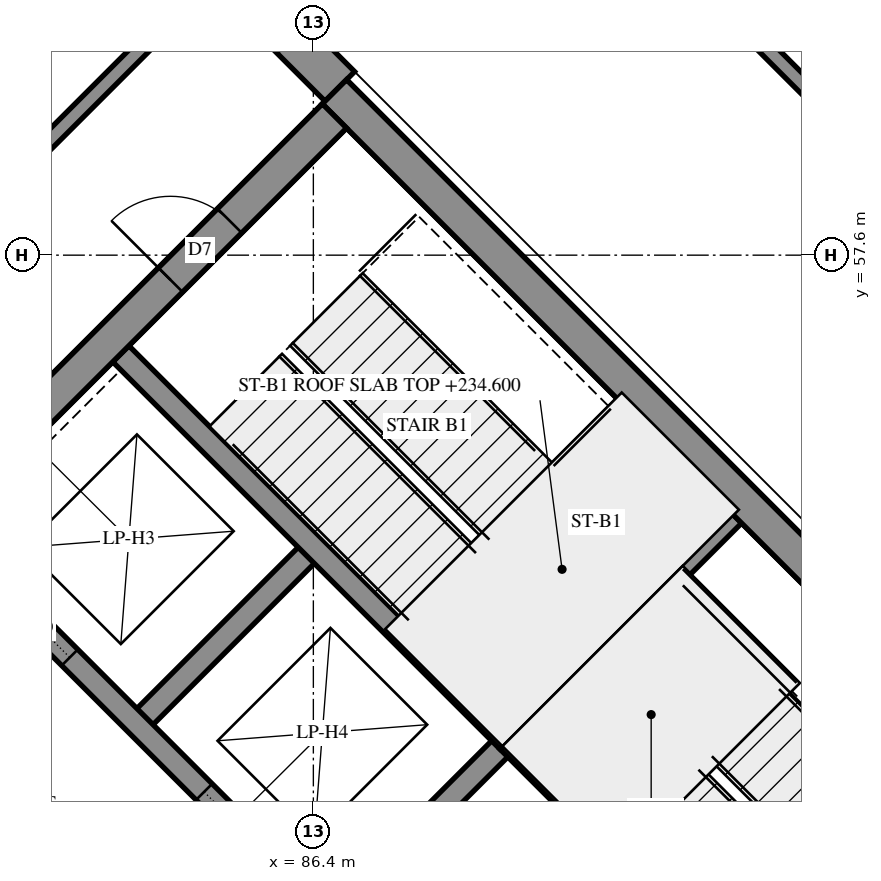
"""IFC4 building model, lengths in metres.
Left out: names, types, materials, properties, quantities, classifications, styles, units other than length and angle.
Written with IfcOpenShell. Run it as: python <this file> out.ifc"""

import sys

from ifc_helpers import new_model, si_unit, direction, frame, frame_2d, origin, place, context, subcontext, project, spatial, polyline, rectangle, outline, extrude, element, fill, save


model = new_model("IFC4")
c1 = context("Model", 3, precision=1e-05, world=origin(), true_north=direction((0.0, 1.0)))
c2 = subcontext(c1, "Body", "Model", "MODEL_VIEW")
j1 = project(units=[si_unit("LENGTHUNIT", "METRE"), si_unit("PLANEANGLEUNIT", "RADIAN")], contexts=[c1])
p1 = place(None, origin())
s1 = spatial("IfcSite", under=j1, at=p1, CompositionType="ELEMENT")
p2 = place(p1, origin())
s2 = spatial("IfcBuilding", under=s1, at=p2, CompositionType="ELEMENT")
p3 = place(p2, frame((0.0, 0.0, 234.6)))
s3 = spatial("IfcBuildingStorey", under=s2, at=p3, CompositionType="ELEMENT", Elevation=234.6)
p4 = place(p3, frame((86.678, 59.749, -0.3), z_axis=(0.0, 0.0, 1.0), x_axis=(0.7071035132, -0.7071100491, 0.0)))
e1 = element("IfcWall", 1, at=p4, inside=s3, PredefinedType="SHEAR", context=c2, shape_type="SweptSolid", body=[
    extrude(rectangle(XDim=15.3, YDim=0.45, at=frame_2d((7.65, 0.0))), origin(), (0.0, 0.0, 1.0), 4.3),
])
p5 = place(p3, frame((76.495, 49.249, -0.3), z_axis=(0.0, 0.0, 1.0), x_axis=(0.7071067812, 0.7071067812, 0.0)))
e2 = element("IfcWall", 2, at=p5, inside=s3, PredefinedType="SHEAR", context=c2, shape_type="SweptSolid", body=[
    extrude(rectangle(XDim=14.4, YDim=0.45, at=frame_2d((7.2, 0.0))), origin(), (0.0, 0.0, 1.0), 4.3),
])
p6 = place(p5, frame((4.55, 0.0, 0.3)))
e3 = element("IfcOpeningElement", 3, at=p6, cuts=e2, PredefinedType="OPENING", context=c2, shape_type="SweptSolid", body=[
    extrude(rectangle(XDim=1.1, YDim=2.1, at=frame_2d((0.55, 1.05))), frame((0.0, 0.235, 0.0), z_axis=(0.0, -1.0, 0.0), x_axis=(1.0, 0.0, 0.0)), (0.0, 0.0, 1.0), 0.47),
])
p7 = place(p5, frame((11.35, 0.0, 0.3)))
e4 = element("IfcOpeningElement", 4, at=p7, cuts=e2, PredefinedType="OPENING", context=c2, shape_type="SweptSolid", body=[
    extrude(rectangle(XDim=1.1, YDim=2.1, at=frame_2d((0.55, 1.05))), frame((0.0, 0.235, 0.0), z_axis=(0.0, -1.0, 0.0), x_axis=(1.0, 0.0, 0.0)), (0.0, 0.0, 1.0), 0.47),
])
p8 = place(p3, frame((84.079, 51.423, 0.0), z_axis=(0.0, 0.0, 1.0), x_axis=(0.7071219326, 0.7070916295, 0.0)))
e5 = element("IfcWall", 5, at=p8, inside=s3, PredefinedType="SOLIDWALL", context=c2, shape_type="SweptSolid", body=[
    extrude(rectangle(XDim=3.3, YDim=0.3, at=frame_2d((1.65, 0.0))), origin(), (0.0, 0.0, 1.0), 4.7),
])
p9 = place(p3, frame((86.625, 48.878, 0.0), z_axis=(0.0, 0.0, 1.0), x_axis=(0.7071067812, 0.7071067812, 0.0)))
e6 = element("IfcWall", 6, at=p9, inside=s3, PredefinedType="SOLIDWALL", context=c2, shape_type="SweptSolid", body=[
    extrude(rectangle(XDim=3.3, YDim=0.3, at=frame_2d((1.65, 0.0))), origin(), (0.0, 0.0, 1.0), 4.7),
])
p10 = place(p3, frame((78.988, 51.423, 0.0), z_axis=(0.0, 0.0, 1.0), x_axis=(0.7071067812, -0.7071067812, 0.0)))
e7 = element("IfcWall", 7, at=p10, inside=s3, PredefinedType="SOLIDWALL", context=c2, shape_type="SweptSolid", body=[
    extrude(rectangle(XDim=14.4, YDim=0.3, at=frame_2d((7.2, 0.0))), origin(), (0.0, 0.0, 1.0), 4.7),
])
p11 = place(p10, frame((1.35, 0.0, 0.0)))
e8 = element("IfcOpeningElement", 8, at=p11, cuts=e7, PredefinedType="OPENING", context=c2, shape_type="SweptSolid", body=[
    extrude(rectangle(XDim=0.9, YDim=2.1, at=frame_2d((0.45, 1.05))), frame((0.0, 0.16, 0.0), z_axis=(0.0, -1.0, 0.0), x_axis=(1.0, 0.0, 0.0)), (0.0, 0.0, 1.0), 0.32),
])
p12 = place(p10, frame((4.95, 0.0, 0.0)))
e9 = element("IfcOpeningElement", 9, at=p12, cuts=e7, PredefinedType="OPENING", context=c2, shape_type="SweptSolid", body=[
    extrude(rectangle(XDim=0.9, YDim=2.1, at=frame_2d((0.45, 1.05))), frame((0.0, 0.16, 0.0), z_axis=(0.0, -1.0, 0.0), x_axis=(1.0, 0.0, 0.0)), (0.0, 0.0, 1.0), 0.32),
])
p13 = place(p10, frame((8.55, 0.0, 0.0)))
e10 = element("IfcOpeningElement", 10, at=p13, cuts=e7, PredefinedType="OPENING", context=c2, shape_type="SweptSolid", body=[
    extrude(rectangle(XDim=0.9, YDim=2.1, at=frame_2d((0.45, 1.05))), frame((0.0, 0.16, 0.0), z_axis=(0.0, -1.0, 0.0), x_axis=(1.0, 0.0, 0.0)), (0.0, 0.0, 1.0), 0.32),
])
p14 = place(p10, frame((12.05, 0.0, 0.0)))
e11 = element("IfcOpeningElement", 11, at=p14, cuts=e7, PredefinedType="OPENING", context=c2, shape_type="SweptSolid", body=[
    extrude(rectangle(XDim=1.1, YDim=2.1, at=frame_2d((0.55, 1.05))), frame((0.0, 0.16, 0.0), z_axis=(0.0, -1.0, 0.0), x_axis=(1.0, 0.0, 0.0)), (0.0, 0.0, 1.0), 0.32),
])
p15 = place(p3, frame((81.534, 53.969, 0.0), z_axis=(0.0, 0.0, 1.0), x_axis=(0.707103309, -0.7071102534, 0.0)))
e12 = element("IfcWall", 12, at=p15, inside=s3, PredefinedType="SOLIDWALL", context=c2, shape_type="SweptSolid", body=[
    extrude(rectangle(XDim=14.4, YDim=0.3, at=frame_2d((7.2, 0.0))), origin(), (0.0, 0.0, 1.0), 4.7),
])
p16 = place(p15, frame((1.25, 0.0, 0.0)))
e13 = element("IfcOpeningElement", 13, at=p16, cuts=e12, PredefinedType="OPENING", context=c2, shape_type="SweptSolid", body=[
    extrude(rectangle(XDim=1.1, YDim=2.1, at=frame_2d((0.55, 1.05))), frame((0.0, 0.16, 0.0), z_axis=(0.0, -1.0, 0.0), x_axis=(1.0, 0.0, 0.0)), (0.0, 0.0, 1.0), 0.32),
])
p17 = place(p15, frame((4.85, 0.0, 0.0)))
e14 = element("IfcOpeningElement", 14, at=p17, cuts=e12, PredefinedType="OPENING", context=c2, shape_type="SweptSolid", body=[
    extrude(rectangle(XDim=1.1, YDim=2.1, at=frame_2d((0.55, 1.05))), frame((0.0, 0.16, 0.0), z_axis=(0.0, -1.0, 0.0), x_axis=(1.0, 0.0, 0.0)), (0.0, 0.0, 1.0), 0.32),
])
p18 = place(p15, frame((8.45, 0.0, 0.0)))
e15 = element("IfcOpeningElement", 15, at=p18, cuts=e12, PredefinedType="OPENING", context=c2, shape_type="SweptSolid", body=[
    extrude(rectangle(XDim=1.1, YDim=2.1, at=frame_2d((0.55, 1.05))), frame((0.0, 0.16, 0.0), z_axis=(0.0, -1.0, 0.0), x_axis=(1.0, 0.0, 0.0)), (0.0, 0.0, 1.0), 0.32),
])
p19 = place(p15, frame((12.05, 0.0, 0.0)))
e16 = element("IfcOpeningElement", 16, at=p19, cuts=e12, PredefinedType="OPENING", context=c2, shape_type="SweptSolid", body=[
    extrude(rectangle(XDim=1.1, YDim=2.1, at=frame_2d((0.55, 1.05))), frame((0.0, 0.16, 0.0), z_axis=(0.0, -1.0, 0.0), x_axis=(1.0, 0.0, 0.0)), (0.0, 0.0, 1.0), 0.32),
])
for number, where, z_axis, x_axis in (
    (17, (83.867, 56.302, 0.0), (0.0, 0.0, 1.0), (0.707, -0.707, 0.0)),
    (18, (88.958, 51.211, 0.0), (0.0, 0.0, 1.0), (0.707, -0.707, 0.0)),
):
    element("IfcWall", number, at=place(p3, frame(where, z_axis=z_axis, x_axis=x_axis)), inside=s3, PredefinedType="SOLIDWALL", context=c2, shape_type="SweptSolid", body=[
        extrude(rectangle(XDim=7.2, YDim=0.3, at=frame_2d((3.6, 0.0))), origin(), (0.0, 0.0, 1.0), 4.7),
    ])
p20 = place(p3, frame((88.958, 51.211, 0.0), z_axis=(0.0, 0.0, 1.0), x_axis=(0.7071067812, 0.7071067812, 0.0)))
e19 = element("IfcWall", 19, at=p20, inside=s3, PredefinedType="SOLIDWALL", context=c2, shape_type="SweptSolid", body=[
    extrude(rectangle(XDim=4.2, YDim=0.3, at=frame_2d((2.1, 0.0))), origin(), (0.0, 0.0, 1.0), 4.7),
])
p21 = place(p3, frame((86.748, 59.82, 0.0), z_axis=(0.0, 0.0, 1.0), x_axis=(-0.7071067812, 0.7071067812, 0.0)))
e20 = element("IfcWall", 20, at=p21, inside=s3, PredefinedType="SOLIDWALL", context=c2, shape_type="SweptSolid", body=[
    extrude(outline(polyline([(0.0, -0.275), (12.707, -0.275), (12.479, 0.275), (0.0, 0.275), (0.0, -0.275)])), origin(), (0.0, 0.0, 1.0), 4.7),
])
p22 = place(p21, frame((4.05, 0.0, 0.9)))
e21 = element("IfcOpeningElement", 21, at=p22, cuts=e20, PredefinedType="OPENING", context=c2, shape_type="SweptSolid", body=[
    extrude(rectangle(XDim=1.8, YDim=3.6, at=frame_2d((0.9, 1.8))), frame((0.0, 0.285, 0.0), z_axis=(0.0, -1.0, 0.0), x_axis=(1.0, 0.0, 0.0)), (0.0, 0.0, 1.0), 0.57),
])
p23 = place(p21, frame((7.6, 0.0, 0.9)))
e22 = element("IfcOpeningElement", 22, at=p23, cuts=e20, PredefinedType="OPENING", context=c2, shape_type="SweptSolid", body=[
    extrude(rectangle(XDim=1.8, YDim=3.6, at=frame_2d((0.9, 1.8))), frame((0.0, 0.285, 0.0), z_axis=(0.0, -1.0, 0.0), x_axis=(1.0, 0.0, 0.0)), (0.0, 0.0, 1.0), 0.57),
])
p24 = place(p21, frame((0.888, 0.0, 0.7)))
e23 = element("IfcOpeningElement", 23, at=p24, cuts=e20, PredefinedType="OPENING", context=c2, shape_type="SweptSolid", body=[
    extrude(rectangle(XDim=1.2, YDim=2.3, at=frame_2d((0.6, 1.15))), frame((0.0, 0.285, 0.0), z_axis=(0.0, -1.0, 0.0), x_axis=(1.0, 0.0, 0.0)), (0.0, 0.0, 1.0), 0.57),
])
p25 = place(p3, frame((102.747, 49.938, 0.0), z_axis=(0.0, 0.0, 1.0), x_axis=(-0.7071083109, 0.7071052514, 0.0)))
e24 = element("IfcWall", 24, at=p25, inside=s3, PredefinedType="SOLIDWALL", context=c2, shape_type="SweptSolid", body=[
    extrude(outline(polyline([(-0.1, -0.1), (32.726, -0.1), (32.644, 0.1), (0.1, 0.1), (-0.1, -0.1)])), origin(), (0.0, 0.0, 1.0), 4.7),
])
p26 = place(p3, frame((80.85, 57.034, 0.0), z_axis=(0.0, 0.0, 1.0), x_axis=(0.7071067812, 0.7071067812, 0.0)))
e25 = element("IfcWall", 25, at=p26, inside=s3, PredefinedType="PARTITIONING", context=c2, shape_type="SweptSolid", body=[
    extrude(rectangle(XDim=5.866, YDim=0.2, at=frame_2d((2.933, 0.0))), origin(), (0.0, 0.0, 1.0), 4.7),
])
p27 = place(p26, frame((0.839, 0.0, 0.0)))
e26 = element("IfcOpeningElement", 26, at=p27, cuts=e25, PredefinedType="OPENING", context=c2, shape_type="SweptSolid", body=[
    extrude(rectangle(XDim=1.0, YDim=2.1, at=frame_2d((0.5, 1.05))), frame((0.0, 0.11, 0.0), z_axis=(0.0, -1.0, 0.0), x_axis=(1.0, 0.0, 0.0)), (0.0, 0.0, 1.0), 0.22),
])
p28 = place(p7, origin())
e27 = element("IfcDoor", 27, at=p28, inside=s3, OperationType="SINGLE_SWING_LEFT", PredefinedType="DOOR", context=c2, shape_type="SweptSolid", body=[
    extrude(rectangle(XDim=1.1, YDim=2.1, at=frame_2d((0.55, 1.05))), frame((0.0, 0.025, 0.0), z_axis=(0.0, -1.0, 0.0), x_axis=(1.0, 0.0, 0.0)), (0.0, 0.0, 1.0), 0.05),
])
fill(e4, e27)
p29 = place(p16, origin())
e28 = element("IfcDoor", 28, at=p29, inside=s3, OperationType="SLIDING_TO_LEFT", PredefinedType="DOOR", context=c2, shape_type="SweptSolid", body=[
    extrude(rectangle(XDim=1.1, YDim=2.1, at=frame_2d((0.55, 1.05))), frame((0.0, 0.025, 0.0), z_axis=(0.0, -1.0, 0.0), x_axis=(1.0, 0.0, 0.0)), (0.0, 0.0, 1.0), 0.05),
])
fill(e13, e28)
p30 = place(p17, origin())
e29 = element("IfcDoor", 29, at=p30, inside=s3, OperationType="SLIDING_TO_RIGHT", PredefinedType="DOOR", context=c2, shape_type="SweptSolid", body=[
    extrude(rectangle(XDim=1.1, YDim=2.1, at=frame_2d((0.55, 1.05))), frame((0.0, 0.025, 0.0), z_axis=(0.0, -1.0, 0.0), x_axis=(1.0, 0.0, 0.0)), (0.0, 0.0, 1.0), 0.05),
])
fill(e14, e29)
save(model, sys.argv[1])
